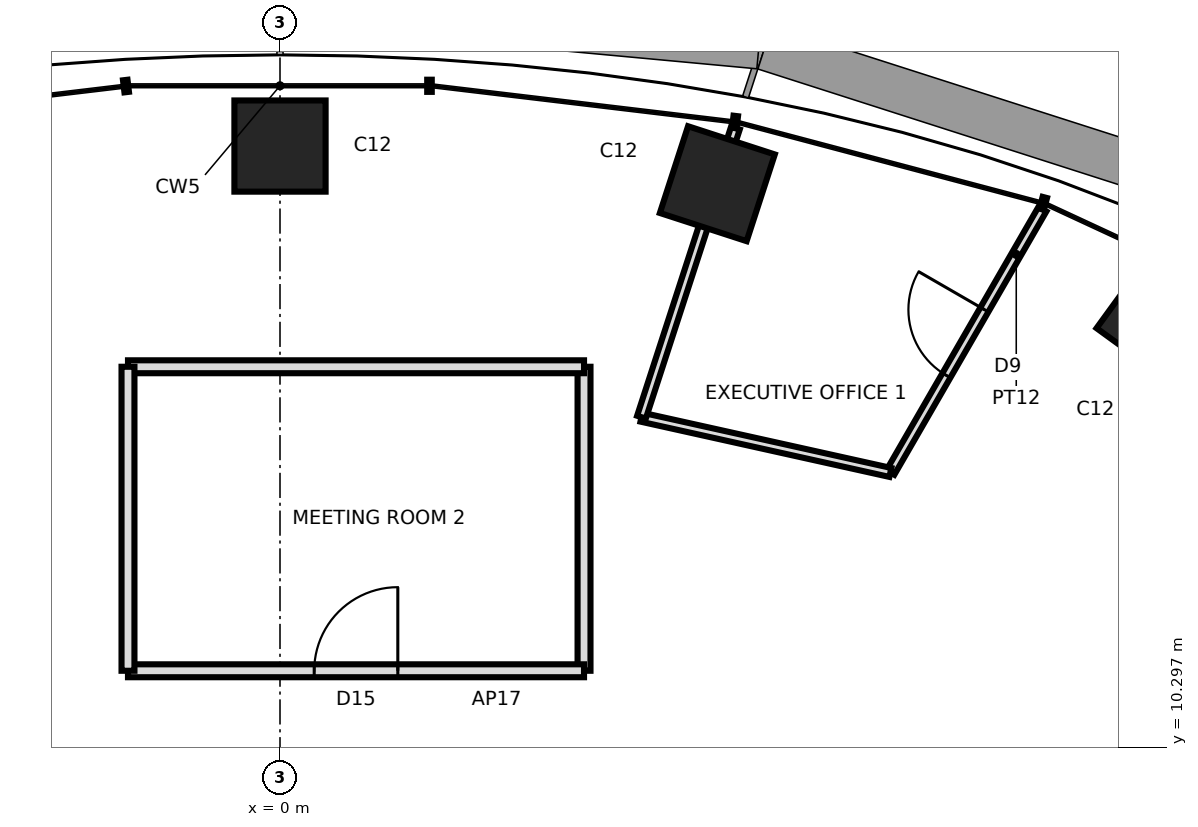
"""IFC4 building model, lengths in metres.
Left out: names, types, materials, properties, quantities, classifications, styles, units other than length and angle.
Written with IfcOpenShell. Run it as: python <this file> out.ifc"""

import sys

from ifc_helpers import new_model, si_unit, direction, frame, frame_2d, origin, origin_2d, place, context, subcontext, project, spatial, rectangle, extrude, element, fill, save


model = new_model("IFC4")
c1 = context("Model", 3, precision=1e-05, world=origin(), true_north=direction((0.0, 1.0)))
c2 = subcontext(c1, "Body", "Model", "MODEL_VIEW")
j1 = project(units=[si_unit("LENGTHUNIT", "METRE"), si_unit("PLANEANGLEUNIT", "RADIAN")], contexts=[c1])
p1 = place(None, origin())
s1 = spatial("IfcSite", under=j1, at=p1, CompositionType="ELEMENT")
p2 = place(p1, origin())
s2 = spatial("IfcBuilding", under=s1, at=p2, CompositionType="ELEMENT")
p3 = place(p2, frame((0.0, 0.0, 264.4)))
s3 = spatial("IfcBuildingStorey", under=s2, at=p3, CompositionType="ELEMENT", Elevation=264.4)
for number, where, z_axis, x_axis in (
    (1, (11.581, 15.94, 0.0), (0.0, 0.0, 1.0), (0.588, 0.809, 0.0)),
    (2, (5.754, 17.708, 0.0), (0.0, 0.0, 1.0), (0.309, 0.951, 0.0)),
    (3, (0.0, 18.204, 0.0), (0.0, 0.0, 1.0), (0.0, 1.0, 0.0)),
):
    element("IfcColumn", number, at=place(p3, frame(where, z_axis=z_axis, x_axis=x_axis)), inside=s3, PredefinedType="COLUMN", context=c2, shape_type="SweptSolid", body=[
        extrude(rectangle(XDim=1.2, YDim=1.2, at=origin_2d()), origin(), (0.0, 0.0, 1.0), 4.2),
    ])
p4 = place(p3, frame((8.031, 13.909, 0.0), z_axis=(0.0, 0.0, 1.0), x_axis=(0.49999894854, 0.866026010844, 0.0)))
e4 = element("IfcWall", 4, at=p4, inside=s3, PredefinedType="PARTITIONING", context=c2, shape_type="SweptSolid", body=[
    extrude(rectangle(XDim=4.0, YDim=0.12, at=frame_2d((2.0, 0.0))), origin(), (0.0, 0.0, 1.0), 4.04),
])
p5 = place(p4, frame((1.474, 0.0, 0.0)))
e5 = element("IfcOpeningElement", 5, at=p5, cuts=e4, PredefinedType="OPENING", context=c2, shape_type="SweptSolid", body=[
    extrude(rectangle(XDim=1.0, YDim=2.4, at=frame_2d((0.5, 1.2))), frame((0.0, 0.07, 0.0), z_axis=(0.0, -1.0, 0.0), x_axis=(1.0, 0.0, 0.0)), (0.0, 0.0, 1.0), 0.14),
])
p6 = place(p3, frame((4.756, 14.637, 0.0), z_axis=(0.0, 0.0, 1.0), x_axis=(0.976216161762, -0.216799459213, 0.0)))
e6 = element("IfcWall", 6, at=p6, inside=s3, PredefinedType="PARTITIONING", context=c2, shape_type="SweptSolid", body=[
    extrude(rectangle(XDim=3.355, YDim=0.12, at=frame_2d((1.677, 0.0))), origin(), (0.0, 0.0, 1.0), 4.04),
])
p7 = place(p3, frame((5.992, 18.441, 0.0), z_axis=(0.0, 0.0, 1.0), x_axis=(-0.309022586479, -0.951054699292, 0.0)))
e7 = element("IfcWall", 7, at=p7, inside=s3, PredefinedType="PARTITIONING", context=c2, shape_type="SweptSolid", body=[
    extrude(rectangle(XDim=4.0, YDim=0.12, at=frame_2d((2.0, 0.0))), origin(), (0.0, 0.0, 1.0), 3.24),
])
p8 = place(p3, frame((4.0, 15.3, 0.0), z_axis=(0.0, 0.0, 1.0), x_axis=(0.0, -1.0, 0.0)))
e8 = element("IfcWall", 8, at=p8, inside=s3, PredefinedType="PARTITIONING", context=c2, shape_type="SweptSolid", body=[
    extrude(rectangle(XDim=4.0, YDim=0.17, at=frame_2d((2.0, 0.0))), origin(), (0.0, 0.0, 1.0), 4.04),
])
p9 = place(p3, frame((4.0, 11.3, 0.0), z_axis=(0.0, 0.0, 1.0), x_axis=(-1.0, 0.0, 0.0)))
e9 = element("IfcWall", 9, at=p9, inside=s3, PredefinedType="PARTITIONING", context=c2, shape_type="SweptSolid", body=[
    extrude(rectangle(XDim=6.0, YDim=0.17, at=frame_2d((3.0, 0.0))), origin(), (0.0, 0.0, 1.0), 4.04),
])
p10 = place(p9, frame((2.45, 0.0, 0.0)))
e10 = element("IfcOpeningElement", 10, at=p10, cuts=e9, PredefinedType="OPENING", context=c2, shape_type="SweptSolid", body=[
    extrude(rectangle(XDim=1.1, YDim=2.4, at=frame_2d((0.55, 1.2))), frame((0.0, 0.095, 0.0), z_axis=(0.0, -1.0, 0.0), x_axis=(1.0, 0.0, 0.0)), (0.0, 0.0, 1.0), 0.19),
])
p11 = place(p3, frame((-2.0, 15.3, 0.0), z_axis=(0.0, 0.0, 1.0), x_axis=(1.0, 0.0, 0.0)))
e11 = element("IfcWall", 11, at=p11, inside=s3, PredefinedType="PARTITIONING", context=c2, shape_type="SweptSolid", body=[
    extrude(rectangle(XDim=6.0, YDim=0.17, at=frame_2d((3.0, 0.0))), origin(), (0.0, 0.0, 1.0), 3.637),
])
p12 = place(p3, frame((-2.0, 11.3, 0.0), z_axis=(0.0, 0.0, 1.0), x_axis=(0.0, 1.0, 0.0)))
e12 = element("IfcWall", 12, at=p12, inside=s3, PredefinedType="PARTITIONING", context=c2, shape_type="SweptSolid", body=[
    extrude(rectangle(XDim=4.0, YDim=0.17, at=frame_2d((2.0, 0.0))), origin(), (0.0, 0.0, 1.0), 4.04),
])
p13 = place(p5, origin())
e13 = element("IfcDoor", 13, at=p13, inside=s3, OperationType="SINGLE_SWING_RIGHT", PredefinedType="DOOR", context=c2, shape_type="SweptSolid", body=[
    extrude(rectangle(XDim=1.0, YDim=2.4, at=frame_2d((0.5, 1.2))), frame((0.0, 0.025, 0.0), z_axis=(0.0, -1.0, 0.0), x_axis=(1.0, 0.0, 0.0)), (0.0, 0.0, 1.0), 0.05),
])
fill(e5, e13)
p14 = place(p10, frame((1.1, 0.0, 0.0), z_axis=(0.0, 0.0, 1.0), x_axis=(-1.0, 0.0, 0.0)))
e14 = element("IfcDoor", 14, at=p14, inside=s3, OperationType="SINGLE_SWING_RIGHT", PredefinedType="DOOR", context=c2, shape_type="SweptSolid", body=[
    extrude(rectangle(XDim=1.1, YDim=2.4, at=frame_2d((0.55, 1.2))), frame((0.0, 0.025, 0.0), z_axis=(0.0, -1.0, 0.0), x_axis=(1.0, 0.0, 0.0)), (0.0, 0.0, 1.0), 0.05),
])
fill(e10, e14)
save(model, sys.argv[1])
